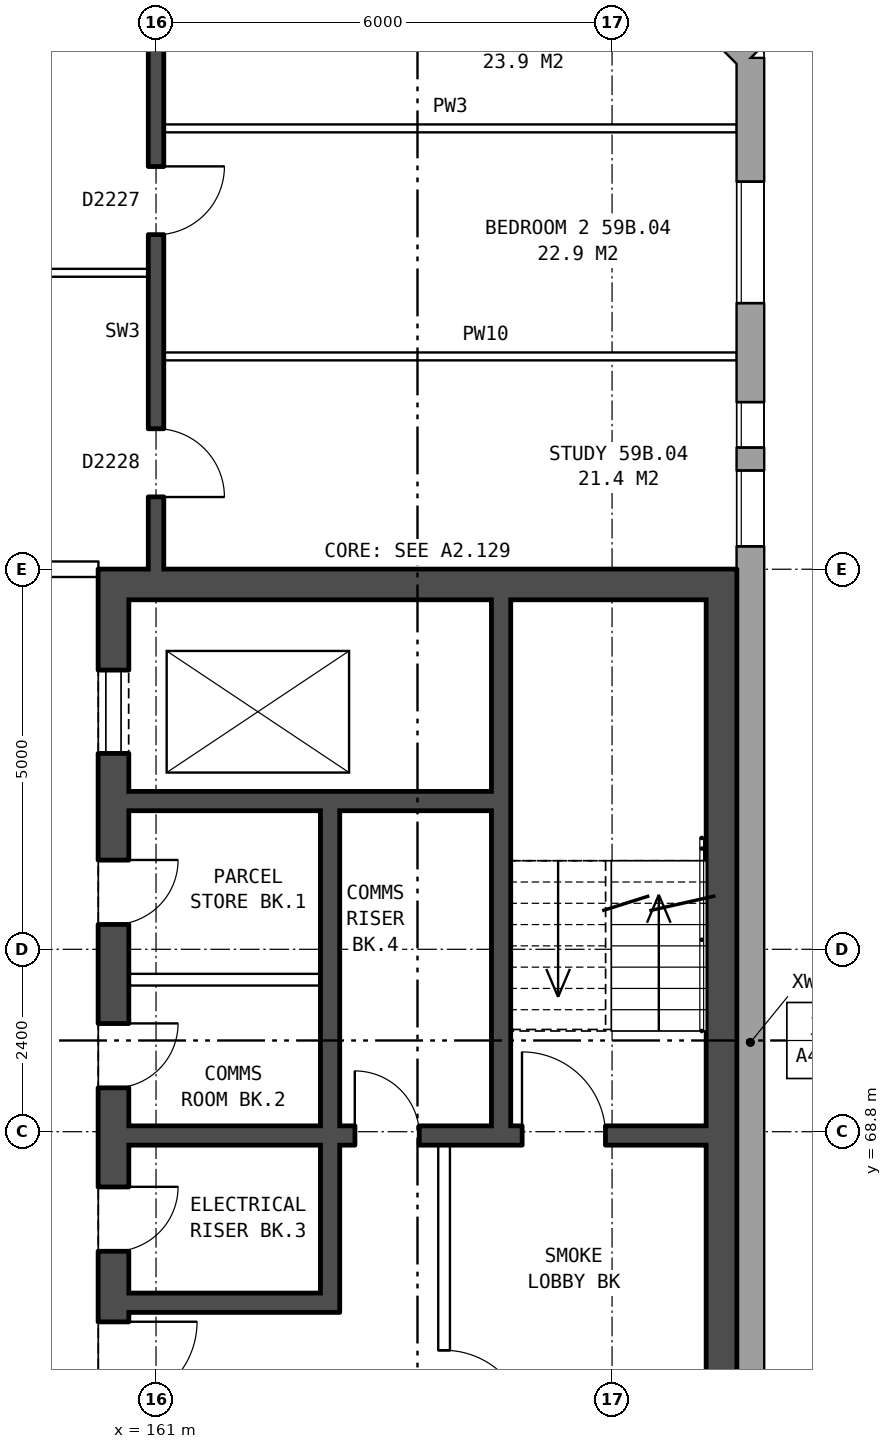
"""IFC4 building model, lengths in metres.
Left out: names, types, materials, properties, quantities, classifications, styles, units other than length and angle.
Written with IfcOpenShell. Run it as: python <this file> out.ifc"""

import sys

from ifc_helpers import new_model, si_unit, direction, frame, frame_2d, origin, place, context, subcontext, project, spatial, rectangle, extrude, element, fill, save


model = new_model("IFC4")
c1 = context("Model", 3, precision=1e-05, world=origin(), true_north=direction((0.0, 1.0)))
c2 = subcontext(c1, "Body", "Model", "MODEL_VIEW")
j1 = project(units=[si_unit("LENGTHUNIT", "METRE"), si_unit("PLANEANGLEUNIT", "RADIAN")], contexts=[c1])
p1 = place(None, origin())
s1 = spatial("IfcSite", under=j1, at=p1, CompositionType="ELEMENT")
p2 = place(p1, origin())
s2 = spatial("IfcBuilding", under=s1, at=p2, CompositionType="ELEMENT")
p3 = place(p2, frame((0.0, 0.0, 209.0)))
s3 = spatial("IfcBuildingStorey", under=s2, at=p3, CompositionType="ELEMENT", Elevation=209.0)
p4 = place(p3, frame((168.82, 57.075, 0.0), z_axis=(0.0, 0.0, 1.0), x_axis=(0.0, 1.0, 0.0)))
e1 = element("IfcWall", 1, at=p4, inside=s3, PredefinedType="STANDARD", context=c2, shape_type="SweptSolid", body=[
    extrude(rectangle(XDim=25.851, YDim=0.36, at=frame_2d((12.925, 0.0))), origin(), (0.0, 0.0, 1.0), 2.85),
])
p5 = place(p4, frame((1.625, 0.0, 0.8)))
e2 = element("IfcOpeningElement", 2, at=p5, cuts=e1, PredefinedType="OPENING", context=c2, shape_type="SweptSolid", body=[
    extrude(rectangle(XDim=1.6, YDim=1.8, at=frame_2d((0.8, 0.9))), frame((0.0, 0.19, 0.0), z_axis=(0.0, -1.0, 0.0), x_axis=(1.0, 0.0, 0.0)), (0.0, 0.0, 1.0), 0.38),
])
p6 = place(p4, frame((4.475, 0.0, 0.15)))
e3 = element("IfcOpeningElement", 3, at=p6, cuts=e1, PredefinedType="OPENING", context=c2, shape_type="SweptSolid", body=[
    extrude(rectangle(XDim=0.6, YDim=0.9, at=frame_2d((0.3, 0.45))), frame((0.0, 0.19, 0.0), z_axis=(0.0, -1.0, 0.0), x_axis=(1.0, 0.0, 0.0)), (0.0, 0.0, 1.0), 0.38),
])
p7 = place(p4, frame((19.425, 0.0, 0.25)))
e4 = element("IfcOpeningElement", 4, at=p7, cuts=e1, PredefinedType="OPENING", context=c2, shape_type="SweptSolid", body=[
    extrude(rectangle(XDim=1.0, YDim=1.8, at=frame_2d((0.5, 0.9))), frame((0.0, 0.19, 0.0), z_axis=(0.0, -1.0, 0.0), x_axis=(1.0, 0.0, 0.0)), (0.0, 0.0, 1.0), 0.38),
])
p8 = place(p4, frame((22.625, 0.0, 0.8)))
e5 = element("IfcOpeningElement", 5, at=p8, cuts=e1, PredefinedType="OPENING", context=c2, shape_type="SweptSolid", body=[
    extrude(rectangle(XDim=1.6, YDim=1.8, at=frame_2d((0.8, 0.9))), frame((0.0, 0.19, 0.0), z_axis=(0.0, -1.0, 0.0), x_axis=(1.0, 0.0, 0.0)), (0.0, 0.0, 1.0), 0.38),
])
p9 = place(p4, frame((5.375, 0.0, 0.15)))
e6 = element("IfcOpeningElement", 6, at=p9, cuts=e1, PredefinedType="OPENING", context=c2, shape_type="SweptSolid", body=[
    extrude(rectangle(XDim=1.0, YDim=1.8, at=frame_2d((0.5, 0.9))), frame((0.0, 0.19, 0.0), z_axis=(0.0, -1.0, 0.0), x_axis=(1.0, 0.0, 0.0)), (0.0, 0.0, 1.0), 0.38),
])
p10 = place(p4, frame((20.725, 0.0, 0.15)))
e7 = element("IfcOpeningElement", 7, at=p10, cuts=e1, PredefinedType="OPENING", context=c2, shape_type="SweptSolid", body=[
    extrude(rectangle(XDim=0.6, YDim=0.9, at=frame_2d((0.3, 0.45))), frame((0.0, 0.19, 0.0), z_axis=(0.0, -1.0, 0.0), x_axis=(1.0, 0.0, 0.0)), (0.0, 0.0, 1.0), 0.38),
])
p11 = place(p3, frame((168.82, 82.925, 0.0), z_axis=(0.0, 0.0, 1.0), x_axis=(-0.707106781187, 0.707106781187, 0.0)))
e8 = element("IfcWall", 8, at=p11, inside=s3, PredefinedType="STANDARD", context=c2, shape_type="SweptSolid", body=[
    extrude(rectangle(XDim=4.094, YDim=0.36, at=frame_2d((2.047, 0.0))), origin(), (0.0, 0.0, 1.0), 2.85),
])
p12 = place(p11, frame((1.247, 0.0, 0.8)))
e9 = element("IfcOpeningElement", 9, at=p12, cuts=e8, PredefinedType="OPENING", context=c2, shape_type="SweptSolid", body=[
    extrude(rectangle(XDim=1.6, YDim=1.8, at=frame_2d((0.8, 0.9))), frame((0.0, 0.19, 0.0), z_axis=(0.0, -1.0, 0.0), x_axis=(1.0, 0.0, 0.0)), (0.0, 0.0, 1.0), 0.38),
])
p13 = place(p3, frame((160.44, 76.2, 0.0), z_axis=(0.0, 0.0, 1.0), x_axis=(0.0, -1.0, 0.0)))
e10 = element("IfcWall", 10, at=p13, inside=s3, PredefinedType="SHEAR", context=c2, shape_type="SweptSolid", body=[
    extrude(rectangle(XDim=12.4, YDim=0.4, at=frame_2d((6.2, 0.0))), origin(), (0.0, 0.0, 1.0), 2.85),
])
p14 = place(p13, frame((1.325, 0.0, 0.0)))
e11 = element("IfcOpeningElement", 11, at=p14, cuts=e10, PredefinedType="OPENING", context=c2, shape_type="SweptSolid", body=[
    extrude(rectangle(XDim=1.1, YDim=2.1, at=frame_2d((0.55, 1.05))), frame((0.0, 0.21, 0.0), z_axis=(0.0, -1.0, 0.0), x_axis=(1.0, 0.0, 0.0)), (0.0, 0.0, 1.0), 0.42),
])
p15 = place(p13, frame((3.825, 0.0, 0.0)))
e12 = element("IfcOpeningElement", 12, at=p15, cuts=e10, PredefinedType="OPENING", context=c2, shape_type="SweptSolid", body=[
    extrude(rectangle(XDim=0.85, YDim=2.1, at=frame_2d((0.425, 1.05))), frame((0.0, 0.21, 0.0), z_axis=(0.0, -1.0, 0.0), x_axis=(1.0, 0.0, 0.0)), (0.0, 0.0, 1.0), 0.42),
])
p16 = place(p13, frame((5.975, 0.0, 0.0)))
e13 = element("IfcOpeningElement", 13, at=p16, cuts=e10, PredefinedType="OPENING", context=c2, shape_type="SweptSolid", body=[
    extrude(rectangle(XDim=0.85, YDim=2.1, at=frame_2d((0.425, 1.05))), frame((0.0, 0.21, 0.0), z_axis=(0.0, -1.0, 0.0), x_axis=(1.0, 0.0, 0.0)), (0.0, 0.0, 1.0), 0.42),
])
p17 = place(p13, frame((9.9, 0.0, 0.0)))
e14 = element("IfcOpeningElement", 14, at=p17, cuts=e10, PredefinedType="OPENING", context=c2, shape_type="SweptSolid", body=[
    extrude(rectangle(XDim=1.1, YDim=2.1, at=frame_2d((0.55, 1.05))), frame((0.0, 0.21, 0.0), z_axis=(0.0, -1.0, 0.0), x_axis=(1.0, 0.0, 0.0)), (0.0, 0.0, 1.0), 0.42),
])
p18 = place(p13, frame((8.125, 0.0, 0.0)))
e15 = element("IfcOpeningElement", 15, at=p18, cuts=e10, PredefinedType="OPENING", context=c2, shape_type="SweptSolid", body=[
    extrude(rectangle(XDim=0.85, YDim=2.1, at=frame_2d((0.425, 1.05))), frame((0.0, 0.21, 0.0), z_axis=(0.0, -1.0, 0.0), x_axis=(1.0, 0.0, 0.0)), (0.0, 0.0, 1.0), 0.42),
])
p19 = place(p3, frame((168.44, 76.2, 0.0), z_axis=(0.0, 0.0, 1.0), x_axis=(0.0, -1.0, 0.0)))
e16 = element("IfcWall", 16, at=p19, inside=s3, PredefinedType="SHEAR", context=c2, shape_type="SweptSolid", body=[
    extrude(rectangle(XDim=12.4, YDim=0.4, at=frame_2d((6.2, 0.0))), origin(), (0.0, 0.0, 1.0), 2.85),
])
p20 = place(p3, frame((160.64, 76.0, 0.0), z_axis=(0.0, 0.0, 1.0), x_axis=(1.0, 0.0, 0.0)))
e17 = element("IfcWall", 17, at=p20, inside=s3, PredefinedType="SHEAR", context=c2, shape_type="SweptSolid", body=[
    extrude(rectangle(XDim=7.6, YDim=0.4, at=frame_2d((3.8, 0.0))), origin(), (0.0, 0.0, 1.0), 2.85),
])
p21 = place(p3, frame((160.64, 73.15, 0.0), z_axis=(0.0, 0.0, 1.0), x_axis=(1.0, 0.0, 0.0)))
e18 = element("IfcWall", 18, at=p21, inside=s3, PredefinedType="SHEAR", context=c2, shape_type="SweptSolid", body=[
    extrude(rectangle(XDim=4.775, YDim=0.25, at=frame_2d((2.388, 0.0))), origin(), (0.0, 0.0, 1.0), 2.85),
])
p22 = place(p3, frame((160.64, 70.8, 0.0), z_axis=(0.0, 0.0, 1.0), x_axis=(1.0, 0.0, 0.0)))
e19 = element("IfcWall", 19, at=p22, inside=s3, PredefinedType="PARTITIONING", context=c2, shape_type="SweptSolid", body=[
    extrude(rectangle(XDim=2.525, YDim=0.15, at=frame_2d((1.263, 0.0))), origin(), (0.0, 0.0, 1.0), 2.85),
])
p23 = place(p3, frame((160.64, 68.75, 0.0), z_axis=(0.0, 0.0, 1.0), x_axis=(1.0, 0.0, 0.0)))
e20 = element("IfcWall", 20, at=p23, inside=s3, PredefinedType="SHEAR", context=c2, shape_type="SweptSolid", body=[
    extrude(rectangle(XDim=7.6, YDim=0.25, at=frame_2d((3.8, 0.0))), origin(), (0.0, 0.0, 1.0), 2.85),
])
p24 = place(p23, frame((5.175, 0.0, 0.0)))
e21 = element("IfcOpeningElement", 21, at=p24, cuts=e20, PredefinedType="OPENING", context=c2, shape_type="SweptSolid", body=[
    extrude(rectangle(XDim=1.1, YDim=2.1, at=frame_2d((0.55, 1.05))), frame((0.0, 0.135, 0.0), z_axis=(0.0, -1.0, 0.0), x_axis=(1.0, 0.0, 0.0)), (0.0, 0.0, 1.0), 0.27),
])
p25 = place(p23, frame((2.975, 0.0, 0.0)))
e22 = element("IfcOpeningElement", 22, at=p25, cuts=e20, PredefinedType="OPENING", context=c2, shape_type="SweptSolid", body=[
    extrude(rectangle(XDim=0.85, YDim=2.1, at=frame_2d((0.425, 1.05))), frame((0.0, 0.135, 0.0), z_axis=(0.0, -1.0, 0.0), x_axis=(1.0, 0.0, 0.0)), (0.0, 0.0, 1.0), 0.27),
])
p26 = place(p3, frame((160.64, 66.55, 0.0), z_axis=(0.0, 0.0, 1.0), x_axis=(1.0, 0.0, 0.0)))
e23 = element("IfcWall", 23, at=p26, inside=s3, PredefinedType="SHEAR", context=c2, shape_type="SweptSolid", body=[
    extrude(rectangle(XDim=2.525, YDim=0.25, at=frame_2d((1.263, 0.0))), origin(), (0.0, 0.0, 1.0), 2.85),
])
p27 = place(p3, frame((163.29, 73.025, 0.0), z_axis=(0.0, 0.0, 1.0), x_axis=(0.0, -1.0, 0.0)))
e24 = element("IfcWall", 24, at=p27, inside=s3, PredefinedType="SHEAR", context=c2, shape_type="SweptSolid", body=[
    extrude(rectangle(XDim=4.15, YDim=0.25, at=frame_2d((2.075, 0.0))), origin(), (0.0, 0.0, 1.0), 2.85),
])
p28 = place(p3, frame((163.29, 68.625, 0.0), z_axis=(0.0, 0.0, 1.0), x_axis=(0.0, -1.0, 0.0)))
e25 = element("IfcWall", 25, at=p28, inside=s3, PredefinedType="SHEAR", context=c2, shape_type="SweptSolid", body=[
    extrude(rectangle(XDim=2.2, YDim=0.25, at=frame_2d((1.1, 0.0))), origin(), (0.0, 0.0, 1.0), 2.85),
])
p29 = place(p3, frame((164.79, 68.625, 0.0), z_axis=(0.0, 0.0, 1.0), x_axis=(0.0, -1.0, 0.0)))
e26 = element("IfcWall", 26, at=p29, inside=s3, PredefinedType="PARTITIONING", context=c2, shape_type="SweptSolid", body=[
    extrude(rectangle(XDim=4.425, YDim=0.15, at=frame_2d((2.212, 0.0))), origin(), (0.0, 0.0, 1.0), 2.85),
])
p30 = place(p29, frame((2.7, 0.0, 0.0)))
e27 = element("IfcOpeningElement", 27, at=p30, cuts=e26, PredefinedType="OPENING", context=c2, shape_type="SweptSolid", body=[
    extrude(rectangle(XDim=1.1, YDim=2.1, at=frame_2d((0.55, 1.05))), frame((0.0, 0.085, 0.0), z_axis=(0.0, -1.0, 0.0), x_axis=(1.0, 0.0, 0.0)), (0.0, 0.0, 1.0), 0.17),
])
p31 = place(p3, frame((165.54, 75.8, 0.0), z_axis=(0.0, 0.0, 1.0), x_axis=(0.0, -1.0, 0.0)))
e28 = element("IfcWall", 28, at=p31, inside=s3, PredefinedType="SHEAR", context=c2, shape_type="SweptSolid", body=[
    extrude(rectangle(XDim=6.925, YDim=0.25, at=frame_2d((3.462, 0.0))), origin(), (0.0, 0.0, 1.0), 2.85),
])
p32 = place(p3, frame((157.24, 76.2, 0.0), z_axis=(0.0, 0.0, 1.0), x_axis=(1.0, 0.0, 0.0)))
e29 = element("IfcWall", 29, at=p32, inside=s3, PredefinedType="PARTITIONING", context=c2, shape_type="SweptSolid", body=[
    extrude(rectangle(XDim=3.0, YDim=0.2, at=frame_2d((1.5, 0.0))), origin(), (0.0, 0.0, 1.0), 2.85),
])
p33 = place(p32, frame((1.0, 0.0, 0.0)))
e30 = element("IfcOpeningElement", 30, at=p33, cuts=e29, PredefinedType="OPENING", context=c2, shape_type="SweptSolid", body=[
    extrude(rectangle(XDim=1.0, YDim=2.1, at=frame_2d((0.5, 1.05))), frame((0.0, 0.11, 0.0), z_axis=(0.0, -1.0, 0.0), x_axis=(1.0, 0.0, 0.0)), (0.0, 0.0, 1.0), 0.22),
])
p34 = place(p3, frame((161.1, 79.0, 0.0), z_axis=(0.0, 0.0, 1.0), x_axis=(1.0, 0.0, 0.0)))
e31 = element("IfcWall", 31, at=p34, inside=s3, PredefinedType="PARTITIONING", context=c2, shape_type="SweptSolid", body=[
    extrude(rectangle(XDim=7.54, YDim=0.1, at=frame_2d((3.77, 0.0))), origin(), (0.0, 0.0, 1.0), 2.85),
])
p35 = place(p3, frame((155.1, 80.1, 0.0), z_axis=(0.0, 0.0, 1.0), x_axis=(1.0, 0.0, 0.0)))
e32 = element("IfcWall", 32, at=p35, inside=s3, PredefinedType="PARTITIONING", context=c2, shape_type="SweptSolid", body=[
    extrude(rectangle(XDim=5.8, YDim=0.1, at=frame_2d((2.9, 0.0))), origin(), (0.0, 0.0, 1.0), 2.85),
])
p36 = place(p35, frame((3.6, 0.0, 0.0)))
e33 = element("IfcOpeningElement", 33, at=p36, cuts=e32, PredefinedType="OPENING", context=c2, shape_type="SweptSolid", body=[
    extrude(rectangle(XDim=0.9, YDim=2.1, at=frame_2d((0.45, 1.05))), frame((0.0, 0.06, 0.0), z_axis=(0.0, -1.0, 0.0), x_axis=(1.0, 0.0, 0.0)), (0.0, 0.0, 1.0), 0.12),
])
p37 = place(p35, frame((0.7, 0.0, 0.0)))
e34 = element("IfcOpeningElement", 34, at=p37, cuts=e32, PredefinedType="OPENING", context=c2, shape_type="SweptSolid", body=[
    extrude(rectangle(XDim=0.9, YDim=2.1, at=frame_2d((0.45, 1.05))), frame((0.0, 0.06, 0.0), z_axis=(0.0, -1.0, 0.0), x_axis=(1.0, 0.0, 0.0)), (0.0, 0.0, 1.0), 0.12),
])
p38 = place(p3, frame((161.1, 82.0, 0.0), z_axis=(0.0, 0.0, 1.0), x_axis=(1.0, 0.0, 0.0)))
e35 = element("IfcWall", 35, at=p38, inside=s3, PredefinedType="PARTITIONING", context=c2, shape_type="SweptSolid", body=[
    extrude(rectangle(XDim=7.54, YDim=0.1, at=frame_2d((3.77, 0.0))), origin(), (0.0, 0.0, 1.0), 2.85),
])
p39 = place(p3, frame((161.0, 76.2, 0.0), z_axis=(0.0, 0.0, 1.0), x_axis=(0.0, 1.0, 0.0)))
e36 = element("IfcWall", 36, at=p39, inside=s3, PredefinedType="SOLIDWALL", context=c2, shape_type="SweptSolid", body=[
    extrude(rectangle(XDim=9.44, YDim=0.2, at=frame_2d((4.72, 0.0))), origin(), (0.0, 0.0, 1.0), 2.85),
])
p40 = place(p39, frame((7.17, 0.0, 0.0)))
e37 = element("IfcOpeningElement", 37, at=p40, cuts=e36, PredefinedType="OPENING", context=c2, shape_type="SweptSolid", body=[
    extrude(rectangle(XDim=0.9, YDim=2.1, at=frame_2d((0.45, 1.05))), frame((0.0, 0.11, 0.0), z_axis=(0.0, -1.0, 0.0), x_axis=(1.0, 0.0, 0.0)), (0.0, 0.0, 1.0), 0.22),
])
p41 = place(p39, frame((4.4, 0.0, 0.0)))
e38 = element("IfcOpeningElement", 38, at=p41, cuts=e36, PredefinedType="OPENING", context=c2, shape_type="SweptSolid", body=[
    extrude(rectangle(XDim=0.9, YDim=2.1, at=frame_2d((0.45, 1.05))), frame((0.0, 0.11, 0.0), z_axis=(0.0, -1.0, 0.0), x_axis=(1.0, 0.0, 0.0)), (0.0, 0.0, 1.0), 0.22),
])
p42 = place(p39, frame((0.95, 0.0, 0.0)))
e39 = element("IfcOpeningElement", 39, at=p42, cuts=e36, PredefinedType="OPENING", context=c2, shape_type="SweptSolid", body=[
    extrude(rectangle(XDim=0.9, YDim=2.1, at=frame_2d((0.45, 1.05))), frame((0.0, 0.11, 0.0), z_axis=(0.0, -1.0, 0.0), x_axis=(1.0, 0.0, 0.0)), (0.0, 0.0, 1.0), 0.22),
])
p43 = place(p7, origin())
e40 = element("IfcWindow", 40, at=p43, inside=s3, PartitioningType="SINGLE_PANEL", PredefinedType="WINDOW", context=c2, shape_type="SweptSolid", body=[
    extrude(rectangle(XDim=1.0, YDim=1.8, at=frame_2d((0.5, 0.9))), frame((0.0, 0.15, 0.0), z_axis=(0.0, -1.0, 0.0), x_axis=(1.0, 0.0, 0.0)), (0.0, 0.0, 1.0), 0.06),
])
fill(e4, e40)
p44 = place(p8, origin())
e41 = element("IfcWindow", 41, at=p44, inside=s3, PartitioningType="SINGLE_PANEL", PredefinedType="WINDOW", context=c2, shape_type="SweptSolid", body=[
    extrude(rectangle(XDim=1.6, YDim=1.8, at=frame_2d((0.8, 0.9))), frame((0.0, 0.15, 0.0), z_axis=(0.0, -1.0, 0.0), x_axis=(1.0, 0.0, 0.0)), (0.0, 0.0, 1.0), 0.06),
])
fill(e5, e41)
p45 = place(p14, origin())
e42 = element("IfcDoor", 42, at=p45, inside=s3, OperationType="DOUBLE_DOOR_SLIDING", PredefinedType="DOOR", context=c2, shape_type="SweptSolid", body=[
    extrude(rectangle(XDim=1.1, YDim=2.1, at=frame_2d((0.55, 1.05))), frame((0.0, 0.185, 0.0), z_axis=(0.0, -1.0, 0.0), x_axis=(1.0, 0.0, 0.0)), (0.0, 0.0, 1.0), 0.05),
])
fill(e11, e42)
p46 = place(p15, origin())
e43 = element("IfcDoor", 43, at=p46, inside=s3, OperationType="SINGLE_SWING_LEFT", PredefinedType="DOOR", context=c2, shape_type="SweptSolid", body=[
    extrude(rectangle(XDim=0.85, YDim=2.1, at=frame_2d((0.425, 1.05))), frame((0.0, 0.185, 0.0), z_axis=(0.0, -1.0, 0.0), x_axis=(1.0, 0.0, 0.0)), (0.0, 0.0, 1.0), 0.05),
])
fill(e12, e43)
p47 = place(p16, origin())
e44 = element("IfcDoor", 44, at=p47, inside=s3, OperationType="SINGLE_SWING_LEFT", PredefinedType="DOOR", context=c2, shape_type="SweptSolid", body=[
    extrude(rectangle(XDim=0.85, YDim=2.1, at=frame_2d((0.425, 1.05))), frame((0.0, 0.185, 0.0), z_axis=(0.0, -1.0, 0.0), x_axis=(1.0, 0.0, 0.0)), (0.0, 0.0, 1.0), 0.05),
])
fill(e13, e44)
p48 = place(p17, origin())
e45 = element("IfcDoor", 45, at=p48, inside=s3, OperationType="SINGLE_SWING_LEFT", PredefinedType="DOOR", context=c2, shape_type="SweptSolid", body=[
    extrude(rectangle(XDim=1.1, YDim=2.1, at=frame_2d((0.55, 1.05))), frame((0.0, 0.185, 0.0), z_axis=(0.0, -1.0, 0.0), x_axis=(1.0, 0.0, 0.0)), (0.0, 0.0, 1.0), 0.05),
])
fill(e14, e45)
p49 = place(p30, origin())
e46 = element("IfcDoor", 46, at=p49, inside=s3, OperationType="SINGLE_SWING_RIGHT", PredefinedType="DOOR", context=c2, shape_type="SweptSolid", body=[
    extrude(rectangle(XDim=1.1, YDim=2.1, at=frame_2d((0.55, 1.05))), frame((0.0, 0.025, 0.0), z_axis=(0.0, -1.0, 0.0), x_axis=(1.0, 0.0, 0.0)), (0.0, 0.0, 1.0), 0.05),
])
fill(e27, e46)
p50 = place(p24, origin())
e47 = element("IfcDoor", 47, at=p50, inside=s3, OperationType="SINGLE_SWING_LEFT", PredefinedType="DOOR", context=c2, shape_type="SweptSolid", body=[
    extrude(rectangle(XDim=1.1, YDim=2.1, at=frame_2d((0.55, 1.05))), frame((0.0, 0.025, 0.0), z_axis=(0.0, -1.0, 0.0), x_axis=(1.0, 0.0, 0.0)), (0.0, 0.0, 1.0), 0.05),
])
fill(e21, e47)
p51 = place(p18, origin())
e48 = element("IfcDoor", 48, at=p51, inside=s3, OperationType="SINGLE_SWING_LEFT", PredefinedType="DOOR", context=c2, shape_type="SweptSolid", body=[
    extrude(rectangle(XDim=0.85, YDim=2.1, at=frame_2d((0.425, 1.05))), frame((0.0, 0.185, 0.0), z_axis=(0.0, -1.0, 0.0), x_axis=(1.0, 0.0, 0.0)), (0.0, 0.0, 1.0), 0.05),
])
fill(e15, e48)
p52 = place(p25, origin())
e49 = element("IfcDoor", 49, at=p52, inside=s3, OperationType="SINGLE_SWING_LEFT", PredefinedType="DOOR", context=c2, shape_type="SweptSolid", body=[
    extrude(rectangle(XDim=0.85, YDim=2.1, at=frame_2d((0.425, 1.05))), frame((0.0, 0.025, 0.0), z_axis=(0.0, -1.0, 0.0), x_axis=(1.0, 0.0, 0.0)), (0.0, 0.0, 1.0), 0.05),
])
fill(e22, e49)
p53 = place(p41, frame((0.9, 0.0, 0.0), z_axis=(0.0, 0.0, 1.0), x_axis=(-1.0, 0.0, 0.0)))
e50 = element("IfcDoor", 50, at=p53, inside=s3, OperationType="SINGLE_SWING_LEFT", PredefinedType="DOOR", context=c2, shape_type="SweptSolid", body=[
    extrude(rectangle(XDim=0.9, YDim=2.1, at=frame_2d((0.45, 1.05))), frame((0.0, 0.025, 0.0), z_axis=(0.0, -1.0, 0.0), x_axis=(1.0, 0.0, 0.0)), (0.0, 0.0, 1.0), 0.05),
])
fill(e38, e50)
p54 = place(p42, frame((0.9, 0.0, 0.0), z_axis=(0.0, 0.0, 1.0), x_axis=(-1.0, 0.0, 0.0)))
e51 = element("IfcDoor", 51, at=p54, inside=s3, OperationType="SINGLE_SWING_RIGHT", PredefinedType="DOOR", context=c2, shape_type="SweptSolid", body=[
    extrude(rectangle(XDim=0.9, YDim=2.1, at=frame_2d((0.45, 1.05))), frame((0.0, 0.025, 0.0), z_axis=(0.0, -1.0, 0.0), x_axis=(1.0, 0.0, 0.0)), (0.0, 0.0, 1.0), 0.05),
])
fill(e39, e51)
p55 = place(p10, origin())
e52 = element("IfcWindow", 52, at=p55, inside=s3, PartitioningType="SINGLE_PANEL", PredefinedType="WINDOW", context=c2, shape_type="SweptSolid", body=[
    extrude(rectangle(XDim=0.6, YDim=0.9, at=frame_2d((0.3, 0.45))), frame((0.0, 0.15, 0.0), z_axis=(0.0, -1.0, 0.0), x_axis=(1.0, 0.0, 0.0)), (0.0, 0.0, 1.0), 0.06),
])
fill(e7, e52)
save(model, sys.argv[1])
